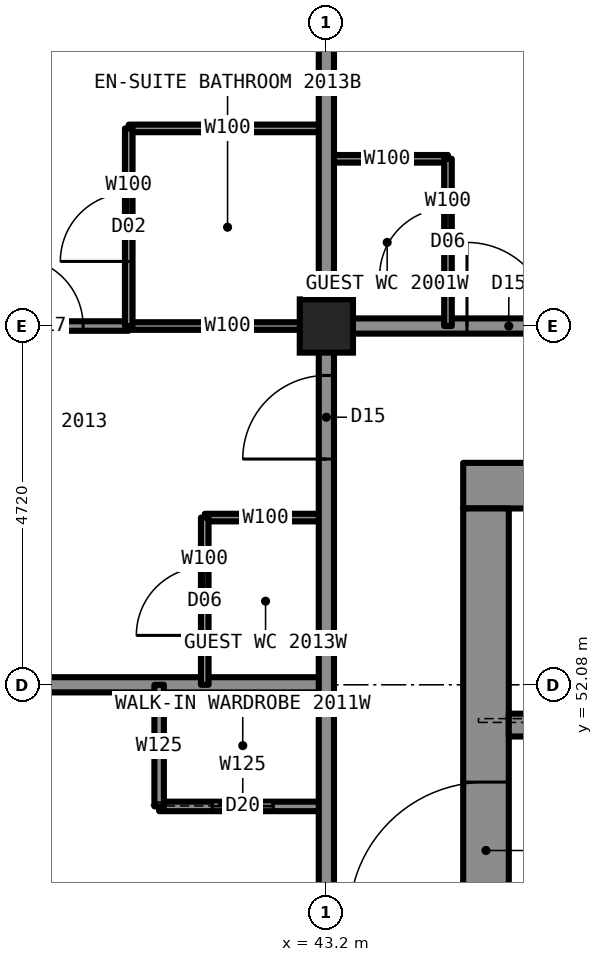
"""IFC4 building model, lengths in metres.
Left out: names, types, materials, properties, quantities, classifications, styles, units other than length and angle.
Written with IfcOpenShell. Run it as: python <this file> out.ifc"""

import sys

from ifc_helpers import new_model, si_unit, direction, frame, frame_2d, origin, origin_2d, place, context, subcontext, project, spatial, rectangle, hollow_rectangle, extrude, element, fill, save


model = new_model("IFC4")
c1 = context("Model", 3, precision=1e-05, world=origin(), true_north=direction((0.0, 1.0)))
c2 = subcontext(c1, "Body", "Model", "MODEL_VIEW")
j1 = project(units=[si_unit("LENGTHUNIT", "METRE"), si_unit("PLANEANGLEUNIT", "RADIAN")], contexts=[c1])
p1 = place(None, origin())
s1 = spatial("IfcSite", under=j1, at=p1, CompositionType="ELEMENT")
p2 = place(p1, origin())
s2 = spatial("IfcBuilding", under=s1, at=p2, CompositionType="ELEMENT")
p3 = place(p2, frame((0.0, 0.0, 70.5)))
s3 = spatial("IfcBuildingStorey", under=s2, at=p3, CompositionType="ELEMENT", Elevation=70.5)
p4 = place(p3, frame((43.2, 56.8, 0.0), z_axis=(0.0, 0.0, 1.0), x_axis=(1.0, 0.0, 0.0)))
e1 = element("IfcColumn", 1, at=p4, inside=s3, PredefinedType="COLUMN", context=c2, shape_type="SweptSolid", body=[
    extrude(hollow_rectangle(XDim=0.7, YDim=0.7, WallThickness=0.06, at=origin_2d()), origin(), (0.0, 0.0, 1.0), 3.5),
])
p5 = place(p3, frame((45.0, 54.7, 0.0), z_axis=(0.0, 0.0, 1.0), x_axis=(1.0, 0.0, 0.0)))
e2 = element("IfcWall", 2, at=p5, inside=s3, PredefinedType="SHEAR", context=c2, shape_type="SweptSolid", body=[
    extrude(rectangle(XDim=20.0, YDim=0.6, at=frame_2d((10.0, 0.0))), origin(), (0.0, 0.0, 1.0), 3.5),
])
p6 = place(p3, frame((45.3, 35.6, 0.0), z_axis=(0.0, 0.0, 1.0), x_axis=(0.0, 1.0, 0.0)))
e3 = element("IfcWall", 3, at=p6, inside=s3, PredefinedType="SHEAR", context=c2, shape_type="SweptSolid", body=[
    extrude(rectangle(XDim=18.8, YDim=0.6, at=frame_2d((9.4, 0.0))), origin(), (0.0, 0.0, 1.0), 3.5),
])
p7 = place(p6, frame((13.4, 0.0, 0.0)))
e4 = element("IfcOpeningElement", 4, at=p7, cuts=e3, PredefinedType="OPENING", context=c2, shape_type="SweptSolid", body=[
    extrude(rectangle(XDim=1.8, YDim=2.2, at=frame_2d((0.9, 1.1))), frame((0.0, 0.31, 0.0), z_axis=(0.0, -1.0, 0.0), x_axis=(1.0, 0.0, 0.0)), (0.0, 0.0, 1.0), 0.62),
])
p8 = place(p6, frame((3.6, 0.0, 0.0)))
e5 = element("IfcOpeningElement", 5, at=p8, cuts=e3, PredefinedType="OPENING", context=c2, shape_type="SweptSolid", body=[
    extrude(rectangle(XDim=1.8, YDim=2.2, at=frame_2d((0.9, 1.1))), frame((0.0, 0.31, 0.0), z_axis=(0.0, -1.0, 0.0), x_axis=(1.0, 0.0, 0.0)), (0.0, 0.0, 1.0), 0.62),
])
p9 = place(p6, frame((6.4, 0.0, 0.0)))
e6 = element("IfcOpeningElement", 6, at=p9, cuts=e3, PredefinedType="OPENING", context=c2, shape_type="SweptSolid", body=[
    extrude(rectangle(XDim=1.2, YDim=2.2, at=frame_2d((0.6, 1.1))), frame((0.0, 0.31, 0.0), z_axis=(0.0, -1.0, 0.0), x_axis=(1.0, 0.0, 0.0)), (0.0, 0.0, 1.0), 0.62),
])
p10 = place(p3, frame((45.6, 51.55, 0.0), z_axis=(0.0, 0.0, 1.0), x_axis=(1.0, 0.0, 0.0)))
e7 = element("IfcWall", 7, at=p10, inside=s3, PredefinedType="SHEAR", context=c2, shape_type="SweptSolid", body=[
    extrude(rectangle(XDim=18.8, YDim=0.3, at=frame_2d((9.4, 0.0))), origin(), (0.0, 0.0, 1.0), 3.5),
])
p11 = place(p10, frame((0.7, 0.0, 0.0)))
e8 = element("IfcOpeningElement", 8, at=p11, cuts=e7, PredefinedType="OPENING", context=c2, shape_type="SweptSolid", body=[
    extrude(rectangle(XDim=1.1, YDim=2.2, at=frame_2d((0.55, 1.1))), frame((0.0, 0.16, 0.0), z_axis=(0.0, -1.0, 0.0), x_axis=(1.0, 0.0, 0.0)), (0.0, 0.0, 1.0), 0.32),
])
p12 = place(p10, frame((3.4, 0.0, 0.0)))
e9 = element("IfcOpeningElement", 9, at=p12, cuts=e7, PredefinedType="OPENING", context=c2, shape_type="SweptSolid", body=[
    extrude(rectangle(XDim=1.1, YDim=2.2, at=frame_2d((0.55, 1.1))), frame((0.0, 0.16, 0.0), z_axis=(0.0, -1.0, 0.0), x_axis=(1.0, 0.0, 0.0)), (0.0, 0.0, 1.0), 0.32),
])
p13 = place(p10, frame((6.1, 0.0, 0.0)))
e10 = element("IfcOpeningElement", 10, at=p13, cuts=e7, PredefinedType="OPENING", context=c2, shape_type="SweptSolid", body=[
    extrude(rectangle(XDim=1.1, YDim=2.2, at=frame_2d((0.55, 1.1))), frame((0.0, 0.16, 0.0), z_axis=(0.0, -1.0, 0.0), x_axis=(1.0, 0.0, 0.0)), (0.0, 0.0, 1.0), 0.32),
])
p14 = place(p10, frame((8.8, 0.0, 0.0)))
e11 = element("IfcOpeningElement", 11, at=p14, cuts=e7, PredefinedType="OPENING", context=c2, shape_type="SweptSolid", body=[
    extrude(rectangle(XDim=1.1, YDim=2.2, at=frame_2d((0.55, 1.1))), frame((0.0, 0.16, 0.0), z_axis=(0.0, -1.0, 0.0), x_axis=(1.0, 0.0, 0.0)), (0.0, 0.0, 1.0), 0.32),
])
p15 = place(p10, frame((11.6, 0.0, 0.0)))
e12 = element("IfcOpeningElement", 12, at=p15, cuts=e7, PredefinedType="OPENING", context=c2, shape_type="SweptSolid", body=[
    extrude(rectangle(XDim=1.1, YDim=2.2, at=frame_2d((0.55, 1.1))), frame((0.0, 0.16, 0.0), z_axis=(0.0, -1.0, 0.0), x_axis=(1.0, 0.0, 0.0)), (0.0, 0.0, 1.0), 0.32),
])
p16 = place(p10, frame((14.3, 0.0, 0.0)))
e13 = element("IfcOpeningElement", 13, at=p16, cuts=e7, PredefinedType="OPENING", context=c2, shape_type="SweptSolid", body=[
    extrude(rectangle(XDim=1.1, YDim=2.2, at=frame_2d((0.55, 1.1))), frame((0.0, 0.16, 0.0), z_axis=(0.0, -1.0, 0.0), x_axis=(1.0, 0.0, 0.0)), (0.0, 0.0, 1.0), 0.32),
])
p17 = place(p3, frame((40.6, 56.8, 0.0), z_axis=(0.0, 0.0, 1.0), x_axis=(1.0, 0.0, 0.0)))
e14 = element("IfcWall", 14, at=p17, inside=s3, PredefinedType="PARTITIONING", context=c2, shape_type="SweptSolid", body=[
    extrude(rectangle(XDim=2.6, YDim=0.1, at=frame_2d((1.3, 0.0))), origin(), (0.0, 0.0, 1.0), 2.573),
])
p18 = place(p3, frame((43.2, 56.8, 0.0), z_axis=(0.0, 0.0, 1.0), x_axis=(1.0, 0.0, 0.0)))
e15 = element("IfcWall", 15, at=p18, inside=s3, PredefinedType="PARTITIONING", context=c2, shape_type="SweptSolid", body=[
    extrude(rectangle(XDim=23.6, YDim=0.2, at=frame_2d((11.8, 0.0))), origin(), (0.0, 0.0, 1.0), 3.33),
])
p19 = place(p18, frame((1.85, 0.0, 0.0)))
e16 = element("IfcOpeningElement", 16, at=p19, cuts=e15, PredefinedType="OPENING", context=c2, shape_type="SweptSolid", body=[
    extrude(rectangle(XDim=1.1, YDim=2.2, at=frame_2d((0.55, 1.1))), frame((0.0, 0.11, 0.0), z_axis=(0.0, -1.0, 0.0), x_axis=(1.0, 0.0, 0.0)), (0.0, 0.0, 1.0), 0.22),
])
p20 = place(p18, frame((17.16, 0.0, 0.0)))
e17 = element("IfcOpeningElement", 17, at=p20, cuts=e15, PredefinedType="OPENING", context=c2, shape_type="SweptSolid", body=[
    extrude(rectangle(XDim=1.0, YDim=2.2, at=frame_2d((0.5, 1.1))), frame((0.0, 0.11, 0.0), z_axis=(0.0, -1.0, 0.0), x_axis=(1.0, 0.0, 0.0)), (0.0, 0.0, 1.0), 0.22),
])
p21 = place(p3, frame((33.3, 56.8, 0.0), z_axis=(0.0, 0.0, 1.0), x_axis=(1.0, 0.0, 0.0)))
e18 = element("IfcWall", 18, at=p21, inside=s3, PredefinedType="PARTITIONING", context=c2, shape_type="SweptSolid", body=[
    extrude(rectangle(XDim=7.3, YDim=0.125, at=frame_2d((3.65, 0.0))), origin(), (0.0, 0.0, 1.0), 2.573),
])
p22 = place(p21, frame((5.8, 0.0, 0.0)))
e19 = element("IfcOpeningElement", 19, at=p22, cuts=e18, PredefinedType="OPENING", context=c2, shape_type="SweptSolid", body=[
    extrude(rectangle(XDim=0.9, YDim=2.2, at=frame_2d((0.45, 1.1))), frame((0.0, 0.073, 0.0), z_axis=(0.0, -1.0, 0.0), x_axis=(1.0, 0.0, 0.0)), (0.0, 0.0, 1.0), 0.145),
])
p23 = place(p21, frame((2.0, 0.0, 0.0)))
e20 = element("IfcOpeningElement", 20, at=p23, cuts=e18, PredefinedType="OPENING", context=c2, shape_type="SweptSolid", body=[
    extrude(rectangle(XDim=0.9, YDim=2.2, at=frame_2d((0.45, 1.1))), frame((0.0, 0.073, 0.0), z_axis=(0.0, -1.0, 0.0), x_axis=(1.0, 0.0, 0.0)), (0.0, 0.0, 1.0), 0.145),
])
p24 = place(p3, frame((43.2, 59.0, 0.0), z_axis=(0.0, 0.0, 1.0), x_axis=(1.0, 0.0, 0.0)))
e21 = element("IfcWall", 21, at=p24, inside=s3, PredefinedType="PARTITIONING", context=c2, shape_type="SweptSolid", body=[
    extrude(rectangle(XDim=1.6, YDim=0.1, at=frame_2d((0.8, 0.0))), origin(), (0.0, 0.0, 1.0), 3.33),
])
p25 = place(p3, frame((40.6, 59.4, 0.0), z_axis=(0.0, 0.0, 1.0), x_axis=(1.0, 0.0, 0.0)))
e22 = element("IfcWall", 22, at=p25, inside=s3, PredefinedType="PARTITIONING", context=c2, shape_type="SweptSolid", body=[
    extrude(rectangle(XDim=2.6, YDim=0.1, at=frame_2d((1.3, 0.0))), origin(), (0.0, 0.0, 1.0), 3.33),
])
p26 = place(p3, frame((41.0, 50.48, 0.0), z_axis=(0.0, 0.0, 1.0), x_axis=(1.0, 0.0, 0.0)))
e23 = element("IfcWall", 23, at=p26, inside=s3, PredefinedType="PARTITIONING", context=c2, shape_type="SweptSolid", body=[
    extrude(rectangle(XDim=2.2, YDim=0.125, at=frame_2d((1.1, 0.0))), origin(), (0.0, 0.0, 1.0), 3.33),
])
p27 = place(p26, frame((0.7, 0.0, 0.0)))
e24 = element("IfcOpeningElement", 24, at=p27, cuts=e23, PredefinedType="OPENING", context=c2, shape_type="SweptSolid", body=[
    extrude(rectangle(XDim=0.8, YDim=2.1, at=frame_2d((0.4, 1.05))), frame((0.0, 0.073, 0.0), z_axis=(0.0, -1.0, 0.0), x_axis=(1.0, 0.0, 0.0)), (0.0, 0.0, 1.0), 0.145),
])
p28 = place(p3, frame((33.3, 52.08, 0.0), z_axis=(0.0, 0.0, 1.0), x_axis=(1.0, 0.0, 0.0)))
e25 = element("IfcWall", 25, at=p28, inside=s3, PredefinedType="PARTITIONING", context=c2, shape_type="SweptSolid", body=[
    extrude(rectangle(XDim=9.9, YDim=0.2, at=frame_2d((4.95, 0.0))), origin(), (0.0, 0.0, 1.0), 2.573),
])
p29 = place(p3, frame((41.6, 54.28, 0.0), z_axis=(0.0, 0.0, 1.0), x_axis=(1.0, 0.0, 0.0)))
e26 = element("IfcWall", 26, at=p29, inside=s3, PredefinedType="PARTITIONING", context=c2, shape_type="SweptSolid", body=[
    extrude(rectangle(XDim=1.6, YDim=0.1, at=frame_2d((0.8, 0.0))), origin(), (0.0, 0.0, 1.0), 2.723),
])
p30 = place(p3, frame((44.8, 56.8, 0.0), z_axis=(0.0, 0.0, 1.0), x_axis=(0.0, 1.0, 0.0)))
e27 = element("IfcWall", 27, at=p30, inside=s3, PredefinedType="PARTITIONING", context=c2, shape_type="SweptSolid", body=[
    extrude(rectangle(XDim=2.2, YDim=0.1, at=frame_2d((1.1, 0.0))), origin(), (0.0, 0.0, 1.0), 3.33),
])
p31 = place(p30, frame((0.65, 0.0, 0.0)))
e28 = element("IfcOpeningElement", 28, at=p31, cuts=e27, PredefinedType="OPENING", context=c2, shape_type="SweptSolid", body=[
    extrude(rectangle(XDim=0.9, YDim=2.1, at=frame_2d((0.45, 1.05))), frame((0.0, 0.06, 0.0), z_axis=(0.0, -1.0, 0.0), x_axis=(1.0, 0.0, 0.0)), (0.0, 0.0, 1.0), 0.12),
])
p32 = place(p3, frame((43.2, 33.2, 0.0), z_axis=(0.0, 0.0, 1.0), x_axis=(0.0, 1.0, 0.0)))
e29 = element("IfcWall", 29, at=p32, inside=s3, PredefinedType="PARTITIONING", context=c2, shape_type="SweptSolid", body=[
    extrude(rectangle(XDim=23.6, YDim=0.2, at=frame_2d((11.8, 0.0))), origin(), (0.0, 0.0, 1.0), 3.33),
])
p33 = place(p32, frame((7.87, 0.0, 0.0)))
e30 = element("IfcOpeningElement", 30, at=p33, cuts=e29, PredefinedType="OPENING", context=c2, shape_type="SweptSolid", body=[
    extrude(rectangle(XDim=1.0, YDim=2.2, at=frame_2d((0.5, 1.1))), frame((0.0, 0.11, 0.0), z_axis=(0.0, -1.0, 0.0), x_axis=(1.0, 0.0, 0.0)), (0.0, 0.0, 1.0), 0.22),
])
p34 = place(p32, frame((12.44, 0.0, 0.0)))
e31 = element("IfcOpeningElement", 31, at=p34, cuts=e29, PredefinedType="OPENING", context=c2, shape_type="SweptSolid", body=[
    extrude(rectangle(XDim=1.0, YDim=2.2, at=frame_2d((0.5, 1.1))), frame((0.0, 0.11, 0.0), z_axis=(0.0, -1.0, 0.0), x_axis=(1.0, 0.0, 0.0)), (0.0, 0.0, 1.0), 0.22),
])
p35 = place(p32, frame((21.85, 0.0, 0.0)))
e32 = element("IfcOpeningElement", 32, at=p35, cuts=e29, PredefinedType="OPENING", context=c2, shape_type="SweptSolid", body=[
    extrude(rectangle(XDim=1.1, YDim=2.2, at=frame_2d((0.55, 1.1))), frame((0.0, 0.11, 0.0), z_axis=(0.0, -1.0, 0.0), x_axis=(1.0, 0.0, 0.0)), (0.0, 0.0, 1.0), 0.22),
])
p36 = place(p32, frame((0.66, 0.0, 0.0)))
e33 = element("IfcOpeningElement", 33, at=p36, cuts=e29, PredefinedType="OPENING", context=c2, shape_type="SweptSolid", body=[
    extrude(rectangle(XDim=1.1, YDim=2.2, at=frame_2d((0.55, 1.1))), frame((0.0, 0.11, 0.0), z_axis=(0.0, -1.0, 0.0), x_axis=(1.0, 0.0, 0.0)), (0.0, 0.0, 1.0), 0.22),
])
p37 = place(p3, frame((43.2, 56.8, 0.0), z_axis=(0.0, 0.0, 1.0), x_axis=(0.0, 1.0, 0.0)))
e34 = element("IfcWall", 34, at=p37, inside=s3, PredefinedType="PARTITIONING", context=c2, shape_type="SweptSolid", body=[
    extrude(rectangle(XDim=9.9, YDim=0.2, at=frame_2d((4.95, 0.0))), origin(), (0.0, 0.0, 1.0), 2.573),
])
p38 = place(p3, frame((41.6, 52.08, 0.0), z_axis=(0.0, 0.0, 1.0), x_axis=(0.0, 1.0, 0.0)))
e35 = element("IfcWall", 35, at=p38, inside=s3, PredefinedType="PARTITIONING", context=c2, shape_type="SweptSolid", body=[
    extrude(rectangle(XDim=2.2, YDim=0.1, at=frame_2d((1.1, 0.0))), origin(), (0.0, 0.0, 1.0), 3.33),
])
p39 = place(p38, frame((0.65, 0.0, 0.0)))
e36 = element("IfcOpeningElement", 36, at=p39, cuts=e35, PredefinedType="OPENING", context=c2, shape_type="SweptSolid", body=[
    extrude(rectangle(XDim=0.9, YDim=2.1, at=frame_2d((0.45, 1.05))), frame((0.0, 0.06, 0.0), z_axis=(0.0, -1.0, 0.0), x_axis=(1.0, 0.0, 0.0)), (0.0, 0.0, 1.0), 0.12),
])
p40 = place(p3, frame((41.0, 50.48, 0.0), z_axis=(0.0, 0.0, 1.0), x_axis=(0.0, 1.0, 0.0)))
e37 = element("IfcWall", 37, at=p40, inside=s3, PredefinedType="PARTITIONING", context=c2, shape_type="SweptSolid", body=[
    extrude(rectangle(XDim=1.6, YDim=0.125, at=frame_2d((0.8, 0.0))), origin(), (0.0, 0.0, 1.0), 3.33),
])
p41 = place(p3, frame((40.6, 56.8, 0.0), z_axis=(0.0, 0.0, 1.0), x_axis=(0.0, 1.0, 0.0)))
e38 = element("IfcWall", 38, at=p41, inside=s3, PredefinedType="PARTITIONING", context=c2, shape_type="SweptSolid", body=[
    extrude(rectangle(XDim=2.6, YDim=0.1, at=frame_2d((1.3, 0.0))), origin(), (0.0, 0.0, 1.0), 3.33),
])
p42 = place(p41, frame((0.85, 0.0, 0.0)))
e39 = element("IfcOpeningElement", 39, at=p42, cuts=e38, PredefinedType="OPENING", context=c2, shape_type="SweptSolid", body=[
    extrude(rectangle(XDim=0.9, YDim=2.1, at=frame_2d((0.45, 1.05))), frame((0.0, 0.06, 0.0), z_axis=(0.0, -1.0, 0.0), x_axis=(1.0, 0.0, 0.0)), (0.0, 0.0, 1.0), 0.12),
])
p43 = place(p19, origin())
e40 = element("IfcDoor", 40, at=p43, inside=s3, OperationType="SINGLE_SWING_LEFT", PredefinedType="DOOR", context=c2, shape_type="SweptSolid", body=[
    extrude(rectangle(XDim=1.1, YDim=2.2, at=frame_2d((0.55, 1.1))), frame((0.0, 0.025, 0.0), z_axis=(0.0, -1.0, 0.0), x_axis=(1.0, 0.0, 0.0)), (0.0, 0.0, 1.0), 0.05),
])
fill(e16, e40)
p44 = place(p31, origin())
e41 = element("IfcDoor", 41, at=p44, inside=s3, OperationType="SINGLE_SWING_LEFT", PredefinedType="DOOR", context=c2, shape_type="SweptSolid", body=[
    extrude(rectangle(XDim=0.9, YDim=2.1, at=frame_2d((0.45, 1.05))), frame((0.0, 0.025, 0.0), z_axis=(0.0, -1.0, 0.0), x_axis=(1.0, 0.0, 0.0)), (0.0, 0.0, 1.0), 0.05),
])
fill(e28, e41)
p45 = place(p27, origin())
e42 = element("IfcDoor", 42, at=p45, inside=s3, OperationType="SLIDING_TO_LEFT", PredefinedType="DOOR", context=c2, shape_type="SweptSolid", body=[
    extrude(rectangle(XDim=0.8, YDim=2.1, at=frame_2d((0.4, 1.05))), frame((0.0, 0.025, 0.0), z_axis=(0.0, -1.0, 0.0), x_axis=(1.0, 0.0, 0.0)), (0.0, 0.0, 1.0), 0.05),
])
fill(e24, e42)
p46 = place(p35, origin())
e43 = element("IfcDoor", 43, at=p46, inside=s3, OperationType="SINGLE_SWING_LEFT", PredefinedType="DOOR", context=c2, shape_type="SweptSolid", body=[
    extrude(rectangle(XDim=1.1, YDim=2.2, at=frame_2d((0.55, 1.1))), frame((0.0, 0.025, 0.0), z_axis=(0.0, -1.0, 0.0), x_axis=(1.0, 0.0, 0.0)), (0.0, 0.0, 1.0), 0.05),
])
fill(e32, e43)
p47 = place(p42, origin())
e44 = element("IfcDoor", 44, at=p47, inside=s3, OperationType="SINGLE_SWING_RIGHT", PredefinedType="DOOR", context=c2, shape_type="SweptSolid", body=[
    extrude(rectangle(XDim=0.9, YDim=2.1, at=frame_2d((0.45, 1.05))), frame((0.0, 0.025, 0.0), z_axis=(0.0, -1.0, 0.0), x_axis=(1.0, 0.0, 0.0)), (0.0, 0.0, 1.0), 0.05),
])
fill(e39, e44)
p48 = place(p22, origin())
e45 = element("IfcDoor", 45, at=p48, inside=s3, OperationType="SINGLE_SWING_LEFT", PredefinedType="DOOR", context=c2, shape_type="SweptSolid", body=[
    extrude(rectangle(XDim=0.9, YDim=2.2, at=frame_2d((0.45, 1.1))), frame((0.0, 0.025, 0.0), z_axis=(0.0, -1.0, 0.0), x_axis=(1.0, 0.0, 0.0)), (0.0, 0.0, 1.0), 0.05),
])
fill(e19, e45)
p49 = place(p39, origin())
e46 = element("IfcDoor", 46, at=p49, inside=s3, OperationType="SINGLE_SWING_LEFT", PredefinedType="DOOR", context=c2, shape_type="SweptSolid", body=[
    extrude(rectangle(XDim=0.9, YDim=2.1, at=frame_2d((0.45, 1.05))), frame((0.0, 0.025, 0.0), z_axis=(0.0, -1.0, 0.0), x_axis=(1.0, 0.0, 0.0)), (0.0, 0.0, 1.0), 0.05),
])
fill(e36, e46)
p50 = place(p7, origin())
e47 = element("IfcDoor", 47, at=p50, inside=s3, OperationType="DOUBLE_DOOR_SINGLE_SWING", PredefinedType="DOOR", context=c2, shape_type="SweptSolid", body=[
    extrude(rectangle(XDim=1.8, YDim=2.2, at=frame_2d((0.9, 1.1))), frame((0.0, 0.025, 0.0), z_axis=(0.0, -1.0, 0.0), x_axis=(1.0, 0.0, 0.0)), (0.0, 0.0, 1.0), 0.05),
])
fill(e4, e47)
save(model, sys.argv[1])
